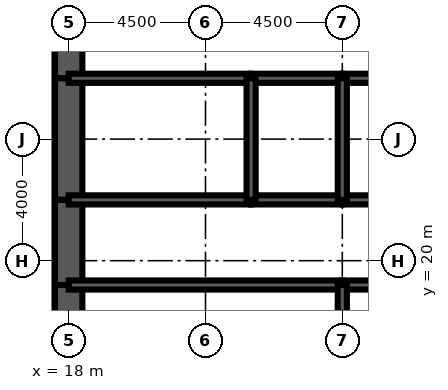
"""IFC4 building model, lengths in metres.
Left out: names, types, materials, properties, quantities, classifications, styles, units other than length and angle.
Written with IfcOpenShell. Run it as: python <this file> out.ifc"""

import sys

from ifc_helpers import new_model, si_unit, direction, frame, frame_2d, origin, place, context, subcontext, project, spatial, rectangle, extrude, element, fill, save


model = new_model("IFC4")
c1 = context("Model", 3, precision=1e-05, world=origin(), true_north=direction((0.0, 1.0)))
c2 = subcontext(c1, "Body", "Model", "MODEL_VIEW")
j1 = project(units=[si_unit("LENGTHUNIT", "METRE"), si_unit("PLANEANGLEUNIT", "RADIAN")], contexts=[c1])
p1 = place(None, origin())
s1 = spatial("IfcSite", under=j1, at=p1, CompositionType="ELEMENT")
p2 = place(p1, origin())
s2 = spatial("IfcBuilding", under=s1, at=p2, CompositionType="ELEMENT")
p3 = place(p2, frame((0.0, 0.0, 90.5)))
s3 = spatial("IfcBuildingStorey", under=s2, at=p3, CompositionType="ELEMENT", Elevation=90.5)
p4 = place(p3, frame((18.0, 28.8, 0.0), z_axis=(0.0, 0.0, 1.0), x_axis=(0.0, -1.0, 0.0)))
e1 = element("IfcWall", 1, at=p4, inside=s3, PredefinedType="SHEAR", context=c2, shape_type="SweptSolid", body=[
    extrude(rectangle(XDim=2.8, YDim=0.9, at=frame_2d((1.4, 0.0))), origin(), (0.0, 0.0, 1.0), 4.5),
])
p5 = place(p4, frame((0.4, 0.0, 0.0)))
e2 = element("IfcOpeningElement", 2, at=p5, cuts=e1, PredefinedType="OPENING", context=c2, shape_type="SweptSolid", body=[
    extrude(rectangle(XDim=1.8, YDim=2.1, at=frame_2d((0.9, 1.05))), frame((0.0, 0.46, 0.0), z_axis=(0.0, -1.0, 0.0), x_axis=(1.0, 0.0, 0.0)), (0.0, 0.0, 1.0), 0.92),
])
p6 = place(p3, frame((18.0, 26.0, 0.0), z_axis=(0.0, 0.0, 1.0), x_axis=(0.0, -1.0, 0.0)))
e3 = element("IfcWall", 3, at=p6, inside=s3, PredefinedType="SHEAR", context=c2, shape_type="SweptSolid", body=[
    extrude(rectangle(XDim=4.0, YDim=0.9, at=frame_2d((2.0, 0.0))), origin(), (0.0, 0.0, 1.0), 4.5),
])
p7 = place(p3, frame((18.0, 22.0, 0.0), z_axis=(0.0, 0.0, 1.0), x_axis=(0.0, -1.0, 0.0)))
e4 = element("IfcWall", 4, at=p7, inside=s3, PredefinedType="SHEAR", context=c2, shape_type="SweptSolid", body=[
    extrude(rectangle(XDim=2.8, YDim=0.9, at=frame_2d((1.4, 0.0))), origin(), (0.0, 0.0, 1.0), 4.5),
])
p8 = place(p7, frame((0.6, 0.0, 0.0)))
e5 = element("IfcOpeningElement", 5, at=p8, cuts=e4, PredefinedType="OPENING", context=c2, shape_type="SweptSolid", body=[
    extrude(rectangle(XDim=1.8, YDim=2.1, at=frame_2d((0.9, 1.05))), frame((0.0, 0.46, 0.0), z_axis=(0.0, -1.0, 0.0), x_axis=(1.0, 0.0, 0.0)), (0.0, 0.0, 1.0), 0.92),
])
p9 = place(p3, frame((18.0, 19.2, 0.0), z_axis=(0.0, 0.0, 1.0), x_axis=(0.0, -1.0, 0.0)))
e6 = element("IfcWall", 6, at=p9, inside=s3, PredefinedType="SHEAR", context=c2, shape_type="SweptSolid", body=[
    extrude(rectangle(XDim=3.2, YDim=0.9, at=frame_2d((1.6, 0.0))), origin(), (0.0, 0.0, 1.0), 4.5),
])
p10 = place(p3, frame((18.0, 19.2, 0.0), z_axis=(0.0, 0.0, 1.0), x_axis=(1.0, 0.0, 0.0)))
e7 = element("IfcWall", 7, at=p10, inside=s3, PredefinedType="SOLIDWALL", context=c2, shape_type="SweptSolid", body=[
    extrude(rectangle(XDim=9.0, YDim=0.3, at=frame_2d((4.5, 0.0))), origin(), (0.0, 0.0, 1.0), 4.5),
])
p11 = place(p10, frame((0.65, 0.0, 0.0)))
e8 = element("IfcOpeningElement", 8, at=p11, cuts=e7, PredefinedType="OPENING", context=c2, shape_type="SweptSolid", body=[
    extrude(rectangle(XDim=1.0, YDim=2.1, at=frame_2d((0.5, 1.05))), frame((0.0, 0.16, 0.0), z_axis=(0.0, -1.0, 0.0), x_axis=(1.0, 0.0, 0.0)), (0.0, 0.0, 1.0), 0.32),
])
p12 = place(p3, frame((27.0, 19.2, 0.0), z_axis=(0.0, 0.0, 1.0), x_axis=(1.0, 0.0, 0.0)))
e9 = element("IfcWall", 9, at=p12, inside=s3, PredefinedType="SOLIDWALL", context=c2, shape_type="SweptSolid", body=[
    extrude(rectangle(XDim=3.0, YDim=0.3, at=frame_2d((1.5, 0.0))), origin(), (0.0, 0.0, 1.0), 4.5),
])
p13 = place(p12, frame((0.95, 0.0, 0.0)))
e10 = element("IfcOpeningElement", 10, at=p13, cuts=e9, PredefinedType="OPENING", context=c2, shape_type="SweptSolid", body=[
    extrude(rectangle(XDim=1.1, YDim=2.2, at=frame_2d((0.55, 1.1))), frame((0.0, 0.16, 0.0), z_axis=(0.0, -1.0, 0.0), x_axis=(1.0, 0.0, 0.0)), (0.0, 0.0, 1.0), 0.32),
])
p14 = place(p3, frame((18.0, 22.0, 0.0), z_axis=(0.0, 0.0, 1.0), x_axis=(1.0, 0.0, 0.0)))
e11 = element("IfcWall", 11, at=p14, inside=s3, PredefinedType="SOLIDWALL", context=c2, shape_type="SweptSolid", body=[
    extrude(rectangle(XDim=6.0, YDim=0.3, at=frame_2d((3.0, 0.0))), origin(), (0.0, 0.0, 1.0), 4.5),
])
p15 = place(p14, frame((4.4, 0.0, 0.0)))
e12 = element("IfcOpeningElement", 12, at=p15, cuts=e11, PredefinedType="OPENING", context=c2, shape_type="SweptSolid", body=[
    extrude(rectangle(XDim=1.0, YDim=2.1, at=frame_2d((0.5, 1.05))), frame((0.0, 0.16, 0.0), z_axis=(0.0, -1.0, 0.0), x_axis=(1.0, 0.0, 0.0)), (0.0, 0.0, 1.0), 0.32),
])
p16 = place(p14, frame((1.0, 0.0, 0.0)))
e13 = element("IfcOpeningElement", 13, at=p16, cuts=e11, PredefinedType="OPENING", context=c2, shape_type="SweptSolid", body=[
    extrude(rectangle(XDim=1.0, YDim=2.1, at=frame_2d((0.5, 1.05))), frame((0.0, 0.16, 0.0), z_axis=(0.0, -1.0, 0.0), x_axis=(1.0, 0.0, 0.0)), (0.0, 0.0, 1.0), 0.32),
])
p17 = place(p3, frame((24.0, 22.0, 0.0), z_axis=(0.0, 0.0, 1.0), x_axis=(1.0, 0.0, 0.0)))
e14 = element("IfcWall", 14, at=p17, inside=s3, PredefinedType="SOLIDWALL", context=c2, shape_type="SweptSolid", body=[
    extrude(rectangle(XDim=3.0, YDim=0.3, at=frame_2d((1.5, 0.0))), origin(), (0.0, 0.0, 1.0), 4.5),
])
p18 = place(p17, frame((1.0, 0.0, 0.0)))
e15 = element("IfcOpeningElement", 15, at=p18, cuts=e14, PredefinedType="OPENING", context=c2, shape_type="SweptSolid", body=[
    extrude(rectangle(XDim=1.0, YDim=2.1, at=frame_2d((0.5, 1.05))), frame((0.0, 0.16, 0.0), z_axis=(0.0, -1.0, 0.0), x_axis=(1.0, 0.0, 0.0)), (0.0, 0.0, 1.0), 0.32),
])
p19 = place(p3, frame((27.0, 22.0, 0.0), z_axis=(0.0, 0.0, 1.0), x_axis=(1.0, 0.0, 0.0)))
e16 = element("IfcWall", 16, at=p19, inside=s3, PredefinedType="SOLIDWALL", context=c2, shape_type="SweptSolid", body=[
    extrude(rectangle(XDim=9.0, YDim=0.3, at=frame_2d((4.5, 0.0))), origin(), (0.0, 0.0, 1.0), 4.5),
])
p20 = place(p19, frame((4.0, 0.0, 0.0)))
e17 = element("IfcOpeningElement", 17, at=p20, cuts=e16, PredefinedType="OPENING", context=c2, shape_type="SweptSolid", body=[
    extrude(rectangle(XDim=1.0, YDim=2.1, at=frame_2d((0.5, 1.05))), frame((0.0, 0.16, 0.0), z_axis=(0.0, -1.0, 0.0), x_axis=(1.0, 0.0, 0.0)), (0.0, 0.0, 1.0), 0.32),
])
p21 = place(p3, frame((18.0, 26.0, 0.0), z_axis=(0.0, 0.0, 1.0), x_axis=(1.0, 0.0, 0.0)))
e18 = element("IfcWall", 18, at=p21, inside=s3, PredefinedType="SOLIDWALL", context=c2, shape_type="SweptSolid", body=[
    extrude(rectangle(XDim=6.0, YDim=0.3, at=frame_2d((3.0, 0.0))), origin(), (0.0, 0.0, 1.0), 4.5),
])
p22 = place(p3, frame((24.0, 26.0, 0.0), z_axis=(0.0, 0.0, 1.0), x_axis=(1.0, 0.0, 0.0)))
e19 = element("IfcWall", 19, at=p22, inside=s3, PredefinedType="SOLIDWALL", context=c2, shape_type="SweptSolid", body=[
    extrude(rectangle(XDim=3.0, YDim=0.3, at=frame_2d((1.5, 0.0))), origin(), (0.0, 0.0, 1.0), 4.5),
])
p23 = place(p3, frame((27.0, 26.0, 0.0), z_axis=(0.0, 0.0, 1.0), x_axis=(1.0, 0.0, 0.0)))
e20 = element("IfcWall", 20, at=p23, inside=s3, PredefinedType="SOLIDWALL", context=c2, shape_type="SweptSolid", body=[
    extrude(rectangle(XDim=9.0, YDim=0.3, at=frame_2d((4.5, 0.0))), origin(), (0.0, 0.0, 1.0), 4.5),
])
p24 = place(p3, frame((27.0, 16.0, 0.0), z_axis=(0.0, 0.0, 1.0), x_axis=(0.0, 1.0, 0.0)))
e21 = element("IfcWall", 21, at=p24, inside=s3, PredefinedType="SOLIDWALL", context=c2, shape_type="SweptSolid", body=[
    extrude(rectangle(XDim=3.2, YDim=0.3, at=frame_2d((1.6, 0.0))), origin(), (0.0, 0.0, 1.0), 4.5),
])
for number, where, z_axis, x_axis in (
    (22, (24.0, 22.0, 0.0), (0.0, 0.0, 1.0), (0.0, 1.0, 0.0)),
    (23, (27.0, 22.0, 0.0), (0.0, 0.0, 1.0), (0.0, 1.0, 0.0)),
):
    element("IfcWall", number, at=place(p3, frame(where, z_axis=z_axis, x_axis=x_axis)), inside=s3, PredefinedType="SOLIDWALL", context=c2, shape_type="SweptSolid", body=[
        extrude(rectangle(XDim=4.0, YDim=0.3, at=frame_2d((2.0, 0.0))), origin(), (0.0, 0.0, 1.0), 4.5),
    ])
p25 = place(p3, frame((20.625, 22.15, 0.0), z_axis=(0.0, 0.0, 1.0), x_axis=(0.0, 1.0, 0.0)))
e24 = element("IfcWall", 24, at=p25, inside=s3, PredefinedType="PARTITIONING", context=c2, shape_type="SweptSolid", body=[
    extrude(rectangle(XDim=3.7, YDim=0.15, at=frame_2d((1.85, 0.0))), origin(), (0.0, 0.0, 1.0), 3.0),
])
p26 = place(p3, frame((24.5, 19.35, 0.0), z_axis=(0.0, 0.0, 1.0), x_axis=(0.0, 1.0, 0.0)))
e25 = element("IfcWall", 25, at=p26, inside=s3, PredefinedType="PARTITIONING", context=c2, shape_type="SweptSolid", body=[
    extrude(rectangle(XDim=2.5, YDim=0.15, at=frame_2d((1.25, 0.0))), origin(), (0.0, 0.0, 1.0), 3.0),
])
p27 = place(p26, frame((1.15, 0.0, 0.0)))
e26 = element("IfcOpeningElement", 26, at=p27, cuts=e25, PredefinedType="OPENING", context=c2, shape_type="SweptSolid", body=[
    extrude(rectangle(XDim=1.0, YDim=2.1, at=frame_2d((0.5, 1.05))), frame((0.0, 0.085, 0.0), z_axis=(0.0, -1.0, 0.0), x_axis=(1.0, 0.0, 0.0)), (0.0, 0.0, 1.0), 0.17),
])
p28 = place(p27, origin())
e27 = element("IfcDoor", 27, at=p28, inside=s3, OperationType="SINGLE_SWING_RIGHT", PredefinedType="DOOR", context=c2, shape_type="SweptSolid", body=[
    extrude(rectangle(XDim=1.0, YDim=2.1, at=frame_2d((0.5, 1.05))), frame((0.0, 0.025, 0.0), z_axis=(0.0, -1.0, 0.0), x_axis=(1.0, 0.0, 0.0)), (0.0, 0.0, 1.0), 0.05),
])
fill(e26, e27)
p29 = place(p11, origin())
e28 = element("IfcDoor", 28, at=p29, inside=s3, OperationType="SINGLE_SWING_LEFT", PredefinedType="DOOR", context=c2, shape_type="SweptSolid", body=[
    extrude(rectangle(XDim=1.0, YDim=2.1, at=frame_2d((0.5, 1.05))), frame((0.0, 0.025, 0.0), z_axis=(0.0, -1.0, 0.0), x_axis=(1.0, 0.0, 0.0)), (0.0, 0.0, 1.0), 0.05),
])
fill(e8, e28)
p30 = place(p8, origin())
e29 = element("IfcDoor", 29, at=p30, inside=s3, OperationType="SINGLE_SWING_LEFT", PredefinedType="DOOR", context=c2, shape_type="SweptSolid", body=[
    extrude(rectangle(XDim=1.8, YDim=2.1, at=frame_2d((0.9, 1.05))), frame((0.0, 0.45, 0.0), z_axis=(0.0, -1.0, 0.0), x_axis=(1.0, 0.0, 0.0)), (0.0, 0.0, 1.0), 0.899),
])
fill(e5, e29)
p31 = place(p5, origin())
e30 = element("IfcDoor", 30, at=p31, inside=s3, OperationType="SINGLE_SWING_LEFT", PredefinedType="DOOR", context=c2, shape_type="SweptSolid", body=[
    extrude(rectangle(XDim=1.8, YDim=2.1, at=frame_2d((0.9, 1.05))), frame((0.0, 0.45, 0.0), z_axis=(0.0, -1.0, 0.0), x_axis=(1.0, 0.0, 0.0)), (0.0, 0.0, 1.0), 0.899),
])
fill(e2, e30)
p32 = place(p15, origin())
e31 = element("IfcDoor", 31, at=p32, inside=s3, OperationType="SINGLE_SWING_RIGHT", PredefinedType="DOOR", context=c2, shape_type="SweptSolid", body=[
    extrude(rectangle(XDim=1.0, YDim=2.1, at=frame_2d((0.5, 1.05))), frame((0.0, 0.025, 0.0), z_axis=(0.0, -1.0, 0.0), x_axis=(1.0, 0.0, 0.0)), (0.0, 0.0, 1.0), 0.05),
])
fill(e12, e31)
p33 = place(p18, origin())
e32 = element("IfcDoor", 32, at=p33, inside=s3, OperationType="SINGLE_SWING_LEFT", PredefinedType="DOOR", context=c2, shape_type="SweptSolid", body=[
    extrude(rectangle(XDim=1.0, YDim=2.1, at=frame_2d((0.5, 1.05))), frame((0.0, 0.025, 0.0), z_axis=(0.0, -1.0, 0.0), x_axis=(1.0, 0.0, 0.0)), (0.0, 0.0, 1.0), 0.05),
])
fill(e15, e32)
p34 = place(p16, origin())
e33 = element("IfcDoor", 33, at=p34, inside=s3, OperationType="SINGLE_SWING_LEFT", PredefinedType="DOOR", context=c2, shape_type="SweptSolid", body=[
    extrude(rectangle(XDim=1.0, YDim=2.1, at=frame_2d((0.5, 1.05))), frame((0.0, 0.025, 0.0), z_axis=(0.0, -1.0, 0.0), x_axis=(1.0, 0.0, 0.0)), (0.0, 0.0, 1.0), 0.05),
])
fill(e13, e33)
save(model, sys.argv[1])
